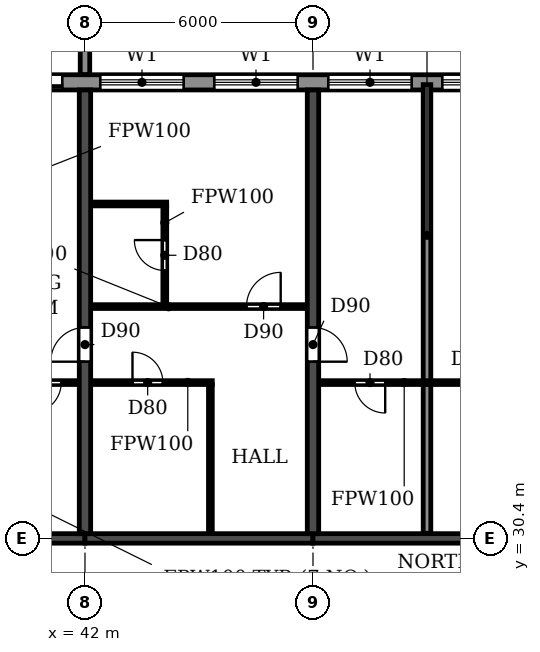
"""IFC4 building model, lengths in metres.
Left out: names, types, materials, properties, quantities, classifications, styles, units other than length and angle.
Written with IfcOpenShell. Run it as: python <this file> out.ifc"""

import sys

from ifc_helpers import new_model, si_unit, direction, frame, frame_2d, origin, place, context, subcontext, project, spatial, polyline, rectangle, outline, extrude, source, transform, mapped, element, fill, save


model = new_model("IFC4")
c1 = context("Model", 3, precision=1e-05, world=origin(), true_north=direction((0.0, 1.0)))
c2 = subcontext(c1, "Body", "Model", "MODEL_VIEW")
j1 = project(units=[si_unit("LENGTHUNIT", "METRE"), si_unit("PLANEANGLEUNIT", "RADIAN")], contexts=[c1])
p1 = place(None, origin())
s1 = spatial("IfcSite", under=j1, at=p1, CompositionType="ELEMENT")
p2 = place(p1, origin())
s2 = spatial("IfcBuilding", under=s1, at=p2, CompositionType="ELEMENT")
p3 = place(p2, frame((0.0, 0.0, 162.0)))
s3 = spatial("IfcBuildingStorey", under=s2, at=p3, CompositionType="ELEMENT", Elevation=162.0)
p4 = place(p3, frame((42.0, 30.525, 0.0), z_axis=(0.0, 0.0, 1.0), x_axis=(0.0, 1.0, 0.0)))
e1 = element("IfcWall", 1, at=p4, inside=s3, PredefinedType="SHEAR", context=c2, shape_type="SweptSolid", body=[
    extrude(rectangle(XDim=11.675, YDim=0.3, at=frame_2d((5.837, 0.0))), origin(), (0.0, 0.0, 1.0), 2.95),
])
p5 = place(p4, frame((4.525, 0.0, 0.0)))
e2 = element("IfcOpeningElement", 2, at=p5, cuts=e1, PredefinedType="OPENING", context=c2, shape_type="SweptSolid", body=[
    extrude(rectangle(XDim=0.9, YDim=2.1, at=frame_2d((0.45, 1.05))), frame((0.0, 0.16, 0.0), z_axis=(0.0, -1.0, 0.0), x_axis=(1.0, 0.0, 0.0)), (0.0, 0.0, 1.0), 0.32),
])
p6 = place(p3, frame((48.0, 30.525, 0.0), z_axis=(0.0, 0.0, 1.0), x_axis=(0.0, 1.0, 0.0)))
e3 = element("IfcWall", 3, at=p6, inside=s3, PredefinedType="SHEAR", context=c2, shape_type="SweptSolid", body=[
    extrude(rectangle(XDim=11.675, YDim=0.3, at=frame_2d((5.837, 0.0))), origin(), (0.0, 0.0, 1.0), 2.95),
])
p7 = place(p6, frame((4.525, 0.0, 0.0)))
e4 = element("IfcOpeningElement", 4, at=p7, cuts=e3, PredefinedType="OPENING", context=c2, shape_type="SweptSolid", body=[
    extrude(rectangle(XDim=0.9, YDim=2.1, at=frame_2d((0.45, 1.05))), frame((0.0, 0.16, 0.0), z_axis=(0.0, -1.0, 0.0), x_axis=(1.0, 0.0, 0.0)), (0.0, 0.0, 1.0), 0.32),
])
p8 = place(p3, frame((36.0, 30.4, 0.0), z_axis=(0.0, 0.0, 1.0), x_axis=(1.0, 0.0, 0.0)))
e5 = element("IfcWall", 5, at=p8, inside=s3, PredefinedType="SHEAR", context=c2, shape_type="SweptSolid", body=[
    extrude(rectangle(XDim=6.0, YDim=0.25, at=frame_2d((3.0, 0.0))), origin(), (0.0, 0.0, 1.0), 2.35),
])
p9 = place(p8, frame((2.55, 0.0, 0.0)))
e6 = element("IfcOpeningElement", 6, at=p9, cuts=e5, PredefinedType="OPENING", context=c2, shape_type="SweptSolid", body=[
    extrude(rectangle(XDim=1.0, YDim=2.1, at=frame_2d((0.5, 1.05))), frame((0.0, 0.135, 0.0), z_axis=(0.0, -1.0, 0.0), x_axis=(1.0, 0.0, 0.0)), (0.0, 0.0, 1.0), 0.27),
])
for number, where, z_axis, x_axis in (
    (7, (42.0, 30.4, 0.0), (0.0, 0.0, 1.0), (1.0, 0.0, 0.0)),
    (8, (48.0, 30.4, 0.0), (0.0, 0.0, 1.0), (1.0, 0.0, 0.0)),
):
    element("IfcWall", number, at=place(p3, frame(where, z_axis=z_axis, x_axis=x_axis)), inside=s3, PredefinedType="SHEAR", context=c2, shape_type="SweptSolid", body=[
        extrude(rectangle(XDim=6.0, YDim=0.25, at=frame_2d((3.0, 0.0))), origin(), (0.0, 0.0, 1.0), 2.35),
    ])
p10 = place(p3, frame((79.317, 42.4, 0.0), z_axis=(0.0, 0.0, 1.0), x_axis=(-1.0, 0.0, 0.0)))
e9 = element("IfcWall", 9, at=p10, inside=s3, PredefinedType="STANDARD", context=c2, shape_type="SweptSolid", body=[
    extrude(rectangle(XDim=56.634, YDim=0.4, at=frame_2d((28.317, 0.0))), origin(), (0.0, 0.0, 1.0), 2.95),
])
p11 = place(p10, frame((52.717, 0.0, 0.9)))
e10 = element("IfcOpeningElement", 10, at=p11, cuts=e9, PredefinedType="OPENING", context=c2, shape_type="SweptSolid", body=[
    extrude(rectangle(XDim=2.2, YDim=1.5, at=frame_2d((1.1, 0.75))), frame((0.0, 0.21, 0.0), z_axis=(0.0, -1.0, 0.0), x_axis=(1.0, 0.0, 0.0)), (0.0, 0.0, 1.0), 0.42),
])
p12 = place(p10, frame((49.917, 0.0, 0.0)))
e11 = element("IfcOpeningElement", 11, at=p12, cuts=e9, PredefinedType="OPENING", context=c2, shape_type="SweptSolid", body=[
    extrude(rectangle(XDim=1.8, YDim=2.4, at=frame_2d((0.9, 1.2))), frame((0.0, 0.21, 0.0), z_axis=(0.0, -1.0, 0.0), x_axis=(1.0, 0.0, 0.0)), (0.0, 0.0, 1.0), 0.42),
])
p13 = place(p10, frame((46.717, 0.0, 0.9)))
e12 = element("IfcOpeningElement", 12, at=p13, cuts=e9, PredefinedType="OPENING", context=c2, shape_type="SweptSolid", body=[
    extrude(rectangle(XDim=2.2, YDim=1.5, at=frame_2d((1.1, 0.75))), frame((0.0, 0.21, 0.0), z_axis=(0.0, -1.0, 0.0), x_axis=(1.0, 0.0, 0.0)), (0.0, 0.0, 1.0), 0.42),
])
p14 = place(p10, frame((43.917, 0.0, 0.0)))
e13 = element("IfcOpeningElement", 13, at=p14, cuts=e9, PredefinedType="OPENING", context=c2, shape_type="SweptSolid", body=[
    extrude(rectangle(XDim=1.8, YDim=2.4, at=frame_2d((0.9, 1.2))), frame((0.0, 0.21, 0.0), z_axis=(0.0, -1.0, 0.0), x_axis=(1.0, 0.0, 0.0)), (0.0, 0.0, 1.0), 0.42),
])
p15 = place(p10, frame((40.717, 0.0, 0.9)))
e14 = element("IfcOpeningElement", 14, at=p15, cuts=e9, PredefinedType="OPENING", context=c2, shape_type="SweptSolid", body=[
    extrude(rectangle(XDim=2.2, YDim=1.5, at=frame_2d((1.1, 0.75))), frame((0.0, 0.21, 0.0), z_axis=(0.0, -1.0, 0.0), x_axis=(1.0, 0.0, 0.0)), (0.0, 0.0, 1.0), 0.42),
])
p16 = place(p10, frame((37.917, 0.0, 0.0)))
e15 = element("IfcOpeningElement", 15, at=p16, cuts=e9, PredefinedType="OPENING", context=c2, shape_type="SweptSolid", body=[
    extrude(rectangle(XDim=1.8, YDim=2.4, at=frame_2d((0.9, 1.2))), frame((0.0, 0.21, 0.0), z_axis=(0.0, -1.0, 0.0), x_axis=(1.0, 0.0, 0.0)), (0.0, 0.0, 1.0), 0.42),
])
p17 = place(p10, frame((34.717, 0.0, 0.9)))
e16 = element("IfcOpeningElement", 16, at=p17, cuts=e9, PredefinedType="OPENING", context=c2, shape_type="SweptSolid", body=[
    extrude(rectangle(XDim=2.2, YDim=1.5, at=frame_2d((1.1, 0.75))), frame((0.0, 0.21, 0.0), z_axis=(0.0, -1.0, 0.0), x_axis=(1.0, 0.0, 0.0)), (0.0, 0.0, 1.0), 0.42),
])
p18 = place(p10, frame((31.717, 0.0, 0.9)))
e17 = element("IfcOpeningElement", 17, at=p18, cuts=e9, PredefinedType="OPENING", context=c2, shape_type="SweptSolid", body=[
    extrude(rectangle(XDim=2.2, YDim=1.5, at=frame_2d((1.1, 0.75))), frame((0.0, 0.21, 0.0), z_axis=(0.0, -1.0, 0.0), x_axis=(1.0, 0.0, 0.0)), (0.0, 0.0, 1.0), 0.42),
])
p19 = place(p10, frame((28.717, 0.0, 0.9)))
e18 = element("IfcOpeningElement", 18, at=p19, cuts=e9, PredefinedType="OPENING", context=c2, shape_type="SweptSolid", body=[
    extrude(rectangle(XDim=2.2, YDim=1.5, at=frame_2d((1.1, 0.75))), frame((0.0, 0.21, 0.0), z_axis=(0.0, -1.0, 0.0), x_axis=(1.0, 0.0, 0.0)), (0.0, 0.0, 1.0), 0.42),
])
p20 = place(p10, frame((25.717, 0.0, 0.9)))
e19 = element("IfcOpeningElement", 19, at=p20, cuts=e9, PredefinedType="OPENING", context=c2, shape_type="SweptSolid", body=[
    extrude(rectangle(XDim=2.2, YDim=1.5, at=frame_2d((1.1, 0.75))), frame((0.0, 0.21, 0.0), z_axis=(0.0, -1.0, 0.0), x_axis=(1.0, 0.0, 0.0)), (0.0, 0.0, 1.0), 0.42),
])
p21 = place(p10, frame((22.717, 0.0, 0.9)))
e20 = element("IfcOpeningElement", 20, at=p21, cuts=e9, PredefinedType="OPENING", context=c2, shape_type="SweptSolid", body=[
    extrude(rectangle(XDim=2.2, YDim=1.5, at=frame_2d((1.1, 0.75))), frame((0.0, 0.21, 0.0), z_axis=(0.0, -1.0, 0.0), x_axis=(1.0, 0.0, 0.0)), (0.0, 0.0, 1.0), 0.42),
])
p22 = place(p10, frame((19.917, 0.0, 0.0)))
e21 = element("IfcOpeningElement", 21, at=p22, cuts=e9, PredefinedType="OPENING", context=c2, shape_type="SweptSolid", body=[
    extrude(rectangle(XDim=1.8, YDim=2.4, at=frame_2d((0.9, 1.2))), frame((0.0, 0.21, 0.0), z_axis=(0.0, -1.0, 0.0), x_axis=(1.0, 0.0, 0.0)), (0.0, 0.0, 1.0), 0.42),
])
p23 = place(p10, frame((16.717, 0.0, 0.9)))
e22 = element("IfcOpeningElement", 22, at=p23, cuts=e9, PredefinedType="OPENING", context=c2, shape_type="SweptSolid", body=[
    extrude(rectangle(XDim=2.2, YDim=1.5, at=frame_2d((1.1, 0.75))), frame((0.0, 0.21, 0.0), z_axis=(0.0, -1.0, 0.0), x_axis=(1.0, 0.0, 0.0)), (0.0, 0.0, 1.0), 0.42),
])
p24 = place(p10, frame((13.717, 0.0, 0.9)))
e23 = element("IfcOpeningElement", 23, at=p24, cuts=e9, PredefinedType="OPENING", context=c2, shape_type="SweptSolid", body=[
    extrude(rectangle(XDim=2.2, YDim=1.5, at=frame_2d((1.1, 0.75))), frame((0.0, 0.21, 0.0), z_axis=(0.0, -1.0, 0.0), x_axis=(1.0, 0.0, 0.0)), (0.0, 0.0, 1.0), 0.42),
])
p25 = place(p10, frame((10.717, 0.0, 0.9)))
e24 = element("IfcOpeningElement", 24, at=p25, cuts=e9, PredefinedType="OPENING", context=c2, shape_type="SweptSolid", body=[
    extrude(rectangle(XDim=2.2, YDim=1.5, at=frame_2d((1.1, 0.75))), frame((0.0, 0.21, 0.0), z_axis=(0.0, -1.0, 0.0), x_axis=(1.0, 0.0, 0.0)), (0.0, 0.0, 1.0), 0.42),
])
p26 = place(p10, frame((7.917, 0.0, 0.0)))
e25 = element("IfcOpeningElement", 25, at=p26, cuts=e9, PredefinedType="OPENING", context=c2, shape_type="SweptSolid", body=[
    extrude(rectangle(XDim=1.8, YDim=2.4, at=frame_2d((0.9, 1.2))), frame((0.0, 0.21, 0.0), z_axis=(0.0, -1.0, 0.0), x_axis=(1.0, 0.0, 0.0)), (0.0, 0.0, 1.0), 0.42),
])
p27 = place(p10, frame((4.717, 0.0, 0.9)))
e26 = element("IfcOpeningElement", 26, at=p27, cuts=e9, PredefinedType="OPENING", context=c2, shape_type="SweptSolid", body=[
    extrude(rectangle(XDim=2.2, YDim=1.5, at=frame_2d((1.1, 0.75))), frame((0.0, 0.21, 0.0), z_axis=(0.0, -1.0, 0.0), x_axis=(1.0, 0.0, 0.0)), (0.0, 0.0, 1.0), 0.42),
])
p28 = place(p10, frame((1.917, 0.0, 0.0)))
e27 = element("IfcOpeningElement", 27, at=p28, cuts=e9, PredefinedType="OPENING", context=c2, shape_type="SweptSolid", body=[
    extrude(rectangle(XDim=1.8, YDim=2.4, at=frame_2d((0.9, 1.2))), frame((0.0, 0.21, 0.0), z_axis=(0.0, -1.0, 0.0), x_axis=(1.0, 0.0, 0.0)), (0.0, 0.0, 1.0), 0.42),
])
m1 = source(origin(), c2, "Body", "SweptSolid", [
    extrude(outline(polyline([(0.0, 0.0), (0.25, 0.0), (0.25, 3.1), (0.0, 3.1), (0.0, 0.0)])), origin(), (0.0, 0.0, 1.0), 3.1),
])
p29 = place(p3, frame((41.875, 42.6, 0.0)))
e28 = element("IfcWall", 28, at=p29, inside=s3, PredefinedType="STANDARD", context=c2, shape_type="MappedRepresentation", body=[
    mapped(m1, transform((0.0, 0.0, 0.0))),
])
p30 = place(p3, frame((51.0, 30.535, 0.0), z_axis=(0.0, 0.0, 1.0), x_axis=(0.0, 1.0, 0.0)))
e29 = element("IfcWall", 29, at=p30, inside=s3, PredefinedType="PARTITIONING", context=c2, shape_type="SweptSolid", body=[
    extrude(rectangle(XDim=11.805, YDim=0.2, at=frame_2d((5.903, 0.0))), origin(), (0.0, 0.0, 1.0), 2.95),
])
p31 = place(p3, frame((39.9, 34.5, 0.0), z_axis=(0.0, 0.0, 1.0), x_axis=(1.0, 0.0, 0.0)))
e30 = element("IfcWall", 30, at=p31, inside=s3, PredefinedType="PARTITIONING", context=c2, shape_type="SweptSolid", body=[
    extrude(rectangle(XDim=1.94, YDim=0.1, at=frame_2d((0.97, 0.0))), origin(), (0.0, 0.0, 1.0), 2.95),
])
p32 = place(p31, frame((0.675, 0.0, 0.0)))
e31 = element("IfcOpeningElement", 31, at=p32, cuts=e30, PredefinedType="OPENING", context=c2, shape_type="SweptSolid", body=[
    extrude(rectangle(XDim=0.8, YDim=2.1, at=frame_2d((0.4, 1.05))), frame((0.0, 0.06, 0.0), z_axis=(0.0, -1.0, 0.0), x_axis=(1.0, 0.0, 0.0)), (0.0, 0.0, 1.0), 0.12),
])
p33 = place(p3, frame((42.16, 34.5, 0.0), z_axis=(0.0, 0.0, 1.0), x_axis=(1.0, 0.0, 0.0)))
e32 = element("IfcWall", 32, at=p33, inside=s3, PredefinedType="PARTITIONING", context=c2, shape_type="SweptSolid", body=[
    extrude(rectangle(XDim=3.19, YDim=0.1, at=frame_2d((1.595, 0.0))), origin(), (0.0, 0.0, 1.0), 2.95),
])
p34 = place(p33, frame((1.09, 0.0, 0.0)))
e33 = element("IfcOpeningElement", 33, at=p34, cuts=e32, PredefinedType="OPENING", context=c2, shape_type="SweptSolid", body=[
    extrude(rectangle(XDim=0.8, YDim=2.1, at=frame_2d((0.4, 1.05))), frame((0.0, 0.06, 0.0), z_axis=(0.0, -1.0, 0.0), x_axis=(1.0, 0.0, 0.0)), (0.0, 0.0, 1.0), 0.12),
])
p35 = place(p3, frame((48.16, 34.5, 0.0), z_axis=(0.0, 0.0, 1.0), x_axis=(1.0, 0.0, 0.0)))
e34 = element("IfcWall", 34, at=p35, inside=s3, PredefinedType="PARTITIONING", context=c2, shape_type="SweptSolid", body=[
    extrude(rectangle(XDim=5.68, YDim=0.1, at=frame_2d((2.84, 0.0))), origin(), (0.0, 0.0, 1.0), 2.95),
])
p36 = place(p35, frame((0.94, 0.0, 0.0)))
e35 = element("IfcOpeningElement", 35, at=p36, cuts=e34, PredefinedType="OPENING", context=c2, shape_type="SweptSolid", body=[
    extrude(rectangle(XDim=0.8, YDim=2.1, at=frame_2d((0.4, 1.05))), frame((0.0, 0.06, 0.0), z_axis=(0.0, -1.0, 0.0), x_axis=(1.0, 0.0, 0.0)), (0.0, 0.0, 1.0), 0.12),
])
p37 = place(p35, frame((3.94, 0.0, 0.0)))
e36 = element("IfcOpeningElement", 36, at=p37, cuts=e34, PredefinedType="OPENING", context=c2, shape_type="SweptSolid", body=[
    extrude(rectangle(XDim=0.8, YDim=2.1, at=frame_2d((0.4, 1.05))), frame((0.0, 0.06, 0.0), z_axis=(0.0, -1.0, 0.0), x_axis=(1.0, 0.0, 0.0)), (0.0, 0.0, 1.0), 0.12),
])
p38 = place(p3, frame((42.16, 36.5, 0.0), z_axis=(0.0, 0.0, 1.0), x_axis=(1.0, 0.0, 0.0)))
e37 = element("IfcWall", 37, at=p38, inside=s3, PredefinedType="PARTITIONING", context=c2, shape_type="SweptSolid", body=[
    extrude(rectangle(XDim=5.68, YDim=0.1, at=frame_2d((2.84, 0.0))), origin(), (0.0, 0.0, 1.0), 2.95),
])
p39 = place(p38, frame((4.09, 0.0, 0.0)))
e38 = element("IfcOpeningElement", 38, at=p39, cuts=e37, PredefinedType="OPENING", context=c2, shape_type="SweptSolid", body=[
    extrude(rectangle(XDim=0.9, YDim=2.1, at=frame_2d((0.45, 1.05))), frame((0.0, 0.06, 0.0), z_axis=(0.0, -1.0, 0.0), x_axis=(1.0, 0.0, 0.0)), (0.0, 0.0, 1.0), 0.12),
])
p40 = place(p3, frame((42.16, 39.2, 0.0), z_axis=(0.0, 0.0, 1.0), x_axis=(1.0, 0.0, 0.0)))
e39 = element("IfcWall", 39, at=p40, inside=s3, PredefinedType="PARTITIONING", context=c2, shape_type="SweptSolid", body=[
    extrude(rectangle(XDim=1.99, YDim=0.1, at=frame_2d((0.995, 0.0))), origin(), (0.0, 0.0, 1.0), 2.95),
])
p41 = place(p3, frame((44.1, 36.55, 0.0), z_axis=(0.0, 0.0, 1.0), x_axis=(0.0, 1.0, 0.0)))
e40 = element("IfcWall", 40, at=p41, inside=s3, PredefinedType="PARTITIONING", context=c2, shape_type="SweptSolid", body=[
    extrude(rectangle(XDim=2.6, YDim=0.1, at=frame_2d((1.3, 0.0))), origin(), (0.0, 0.0, 1.0), 2.95),
])
p42 = place(p41, frame((0.9, 0.0, 0.0)))
e41 = element("IfcOpeningElement", 41, at=p42, cuts=e40, PredefinedType="OPENING", context=c2, shape_type="SweptSolid", body=[
    extrude(rectangle(XDim=0.8, YDim=2.1, at=frame_2d((0.4, 1.05))), frame((0.0, 0.06, 0.0), z_axis=(0.0, -1.0, 0.0), x_axis=(1.0, 0.0, 0.0)), (0.0, 0.0, 1.0), 0.12),
])
p43 = place(p3, frame((45.3, 30.535, 0.0), z_axis=(0.0, 0.0, 1.0), x_axis=(0.0, 1.0, 0.0)))
e42 = element("IfcWall", 42, at=p43, inside=s3, PredefinedType="PARTITIONING", context=c2, shape_type="SweptSolid", body=[
    extrude(rectangle(XDim=3.915, YDim=0.1, at=frame_2d((1.958, 0.0))), origin(), (0.0, 0.0, 1.0), 2.95),
])
p44 = place(p16, origin())
e43 = element("IfcDoor", 43, at=p44, inside=s3, OperationType="DOUBLE_DOOR_SLIDING", PredefinedType="DOOR", context=c2, shape_type="SweptSolid", body=[
    extrude(rectangle(XDim=1.8, YDim=2.4, at=frame_2d((0.9, 1.2))), frame((0.0, 0.025, 0.0), z_axis=(0.0, -1.0, 0.0), x_axis=(1.0, 0.0, 0.0)), (0.0, 0.0, 1.0), 0.05),
])
fill(e15, e43)
p45 = place(p17, origin())
e44 = element("IfcWindow", 44, at=p45, inside=s3, PartitioningType="DOUBLE_PANEL_HORIZONTAL", PredefinedType="WINDOW", context=c2, shape_type="SweptSolid", body=[
    extrude(rectangle(XDim=2.2, YDim=1.5, at=frame_2d((1.1, 0.75))), frame((0.0, 0.03, 0.0), z_axis=(0.0, -1.0, 0.0), x_axis=(1.0, 0.0, 0.0)), (0.0, 0.0, 1.0), 0.06),
])
fill(e16, e44)
p46 = place(p18, origin())
e45 = element("IfcWindow", 45, at=p46, inside=s3, PartitioningType="DOUBLE_PANEL_HORIZONTAL", PredefinedType="WINDOW", context=c2, shape_type="SweptSolid", body=[
    extrude(rectangle(XDim=2.2, YDim=1.5, at=frame_2d((1.1, 0.75))), frame((0.0, 0.03, 0.0), z_axis=(0.0, -1.0, 0.0), x_axis=(1.0, 0.0, 0.0)), (0.0, 0.0, 1.0), 0.06),
])
fill(e17, e45)
p47 = place(p19, origin())
e46 = element("IfcWindow", 46, at=p47, inside=s3, PartitioningType="DOUBLE_PANEL_HORIZONTAL", PredefinedType="WINDOW", context=c2, shape_type="SweptSolid", body=[
    extrude(rectangle(XDim=2.2, YDim=1.5, at=frame_2d((1.1, 0.75))), frame((0.0, 0.03, 0.0), z_axis=(0.0, -1.0, 0.0), x_axis=(1.0, 0.0, 0.0)), (0.0, 0.0, 1.0), 0.06),
])
fill(e18, e46)
p48 = place(p20, origin())
e47 = element("IfcWindow", 47, at=p48, inside=s3, PartitioningType="DOUBLE_PANEL_HORIZONTAL", PredefinedType="WINDOW", context=c2, shape_type="SweptSolid", body=[
    extrude(rectangle(XDim=2.2, YDim=1.5, at=frame_2d((1.1, 0.75))), frame((0.0, 0.03, 0.0), z_axis=(0.0, -1.0, 0.0), x_axis=(1.0, 0.0, 0.0)), (0.0, 0.0, 1.0), 0.06),
])
fill(e19, e47)
p49 = place(p36, frame((0.8, 0.0, 0.0), z_axis=(0.0, 0.0, 1.0), x_axis=(-1.0, 0.0, 0.0)))
e48 = element("IfcDoor", 48, at=p49, inside=s3, OperationType="SINGLE_SWING_LEFT", PredefinedType="DOOR", context=c2, shape_type="SweptSolid", body=[
    extrude(rectangle(XDim=0.8, YDim=2.1, at=frame_2d((0.4, 1.05))), frame((0.0, 0.025, 0.0), z_axis=(0.0, -1.0, 0.0), x_axis=(1.0, 0.0, 0.0)), (0.0, 0.0, 1.0), 0.05),
])
fill(e35, e48)
p50 = place(p34, origin())
e49 = element("IfcDoor", 49, at=p50, inside=s3, OperationType="SINGLE_SWING_LEFT", PredefinedType="DOOR", context=c2, shape_type="SweptSolid", body=[
    extrude(rectangle(XDim=0.8, YDim=2.1, at=frame_2d((0.4, 1.05))), frame((0.0, 0.025, 0.0), z_axis=(0.0, -1.0, 0.0), x_axis=(1.0, 0.0, 0.0)), (0.0, 0.0, 1.0), 0.05),
])
fill(e33, e49)
p51 = place(p39, origin())
e50 = element("IfcDoor", 50, at=p51, inside=s3, OperationType="SINGLE_SWING_RIGHT", PredefinedType="DOOR", context=c2, shape_type="SweptSolid", body=[
    extrude(rectangle(XDim=0.9, YDim=2.1, at=frame_2d((0.45, 1.05))), frame((0.0, 0.025, 0.0), z_axis=(0.0, -1.0, 0.0), x_axis=(1.0, 0.0, 0.0)), (0.0, 0.0, 1.0), 0.05),
])
fill(e38, e50)
p52 = place(p7, frame((0.9, 0.0, 0.0), z_axis=(0.0, 0.0, 1.0), x_axis=(-1.0, 0.0, 0.0)))
e51 = element("IfcDoor", 51, at=p52, inside=s3, OperationType="SINGLE_SWING_RIGHT", PredefinedType="DOOR", context=c2, shape_type="SweptSolid", body=[
    extrude(rectangle(XDim=0.9, YDim=2.1, at=frame_2d((0.45, 1.05))), frame((0.0, 0.025, 0.0), z_axis=(0.0, -1.0, 0.0), x_axis=(1.0, 0.0, 0.0)), (0.0, 0.0, 1.0), 0.05),
])
fill(e4, e51)
p53 = place(p32, frame((0.8, 0.0, 0.0), z_axis=(0.0, 0.0, 1.0), x_axis=(-1.0, 0.0, 0.0)))
e52 = element("IfcDoor", 52, at=p53, inside=s3, OperationType="SINGLE_SWING_RIGHT", PredefinedType="DOOR", context=c2, shape_type="SweptSolid", body=[
    extrude(rectangle(XDim=0.8, YDim=2.1, at=frame_2d((0.4, 1.05))), frame((0.0, 0.025, 0.0), z_axis=(0.0, -1.0, 0.0), x_axis=(1.0, 0.0, 0.0)), (0.0, 0.0, 1.0), 0.05),
])
fill(e31, e52)
p54 = place(p5, origin())
e53 = element("IfcDoor", 53, at=p54, inside=s3, OperationType="SINGLE_SWING_LEFT", PredefinedType="DOOR", context=c2, shape_type="SweptSolid", body=[
    extrude(rectangle(XDim=0.9, YDim=2.1, at=frame_2d((0.45, 1.05))), frame((0.0, 0.025, 0.0), z_axis=(0.0, -1.0, 0.0), x_axis=(1.0, 0.0, 0.0)), (0.0, 0.0, 1.0), 0.05),
])
fill(e2, e53)
p55 = place(p42, origin())
e54 = element("IfcDoor", 54, at=p55, inside=s3, OperationType="SINGLE_SWING_RIGHT", PredefinedType="DOOR", context=c2, shape_type="SweptSolid", body=[
    extrude(rectangle(XDim=0.8, YDim=2.1, at=frame_2d((0.4, 1.05))), frame((0.0, 0.025, 0.0), z_axis=(0.0, -1.0, 0.0), x_axis=(1.0, 0.0, 0.0)), (0.0, 0.0, 1.0), 0.05),
])
fill(e41, e54)
save(model, sys.argv[1])
